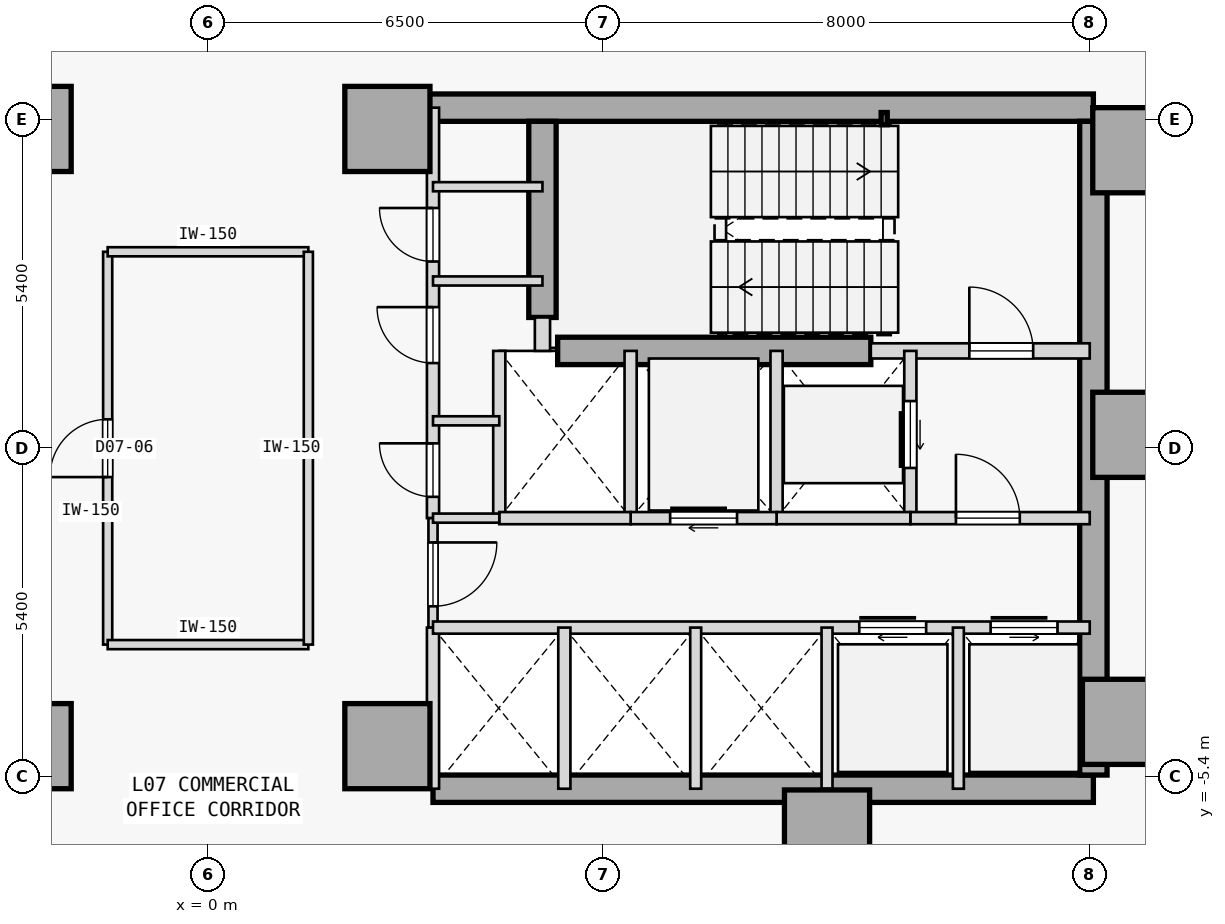
"""IFC4 building model, lengths in metres.
Left out: names, types, materials, properties, quantities, classifications, styles, units other than length and angle.
Written with IfcOpenShell. Run it as: python <this file> out.ifc"""

import sys

from ifc_helpers import new_model, si_unit, direction, frame, frame_2d, origin, origin_2d, place, context, subcontext, project, spatial, rectangle, hollow_rectangle, extrude, element, fill, save


model = new_model("IFC4")
c1 = context("Model", 3, precision=1e-05, world=origin(), true_north=direction((0.0, 1.0)))
c2 = subcontext(c1, "Body", "Model", "MODEL_VIEW")
j1 = project(units=[si_unit("LENGTHUNIT", "METRE"), si_unit("PLANEANGLEUNIT", "RADIAN")], contexts=[c1])
p1 = place(None, origin())
s1 = spatial("IfcSite", under=j1, at=p1, CompositionType="ELEMENT")
p2 = place(p1, origin())
s2 = spatial("IfcBuilding", under=s1, at=p2, CompositionType="ELEMENT")
p3 = place(p2, frame((0.0, 0.0, 33.2)))
s3 = spatial("IfcBuildingStorey", under=s2, at=p3, CompositionType="ELEMENT", Elevation=33.2)
for number, where, z_axis, x_axis in (
    (1, (-2.95, -4.9, 0.0), (0.0, 0.0, 1.0), (1.0, 0.0, 0.0)),
    (2, (-2.95, 5.25, 0.0), (0.0, 0.0, 1.0), (1.0, 0.0, 0.0)),
    (3, (15.25, 4.9, 0.0), (0.0, 0.0, 1.0), (1.0, 0.0, 0.0)),
    (4, (15.25, 0.22, 0.0), (0.0, 0.0, 1.0), (1.0, 0.0, 0.0)),
    (5, (15.08, -4.5, 0.0), (0.0, 0.0, 1.0), (1.0, 0.0, 0.0)),
    (6, (10.18, -6.32, 0.0), (0.0, 0.0, 1.0), (1.0, 0.0, 0.0)),
    (7, (2.95, -4.9, 0.0), (0.0, 0.0, 1.0), (1.0, 0.0, 0.0)),
    (8, (2.95, 5.25, 0.0), (0.0, 0.0, 1.0), (1.0, 0.0, 0.0)),
):
    element("IfcColumn", number, at=place(p3, frame(where, z_axis=z_axis, x_axis=x_axis)), inside=s3, PredefinedType="COLUMN", context=c2, shape_type="SweptSolid", body=[
        extrude(rectangle(XDim=1.4, YDim=1.4, at=origin_2d()), origin(), (0.0, 0.0, 1.0), 3.8),
    ])
p4 = place(p3, frame((3.15, 5.6, 0.0), z_axis=(0.0, 0.0, 1.0), x_axis=(1.0, 0.0, 0.0)))
e9 = element("IfcWall", 9, at=p4, inside=s3, PredefinedType="SHEAR", context=c2, shape_type="SweptSolid", body=[
    extrude(rectangle(XDim=11.41, YDim=0.45, at=frame_2d((5.705, 0.0))), origin(), (0.0, 0.0, 1.0), 3.575),
])
p5 = place(p3, frame((3.7, -5.6, 0.0), z_axis=(0.0, 0.0, 1.0), x_axis=(1.0, 0.0, 0.0)))
e10 = element("IfcWall", 10, at=p5, inside=s3, PredefinedType="SHEAR", context=c2, shape_type="SweptSolid", body=[
    extrude(rectangle(XDim=10.86, YDim=0.45, at=frame_2d((5.43, 0.0))), origin(), (0.0, 0.0, 1.0), 3.575),
])
p6 = place(p3, frame((14.56, -5.375, 0.0), z_axis=(0.0, 0.0, 1.0), x_axis=(0.0, 1.0, 0.0)))
e11 = element("IfcWall", 11, at=p6, inside=s3, PredefinedType="SHEAR", context=c2, shape_type="SweptSolid", body=[
    extrude(rectangle(XDim=10.75, YDim=0.45, at=frame_2d((5.375, 0.0))), origin(), (0.0, 0.0, 1.0), 3.575),
])
p7 = place(p3, frame((5.5, 2.15, 0.0), z_axis=(0.0, 0.0, 1.0), x_axis=(0.0, 1.0, 0.0)))
e12 = element("IfcWall", 12, at=p7, inside=s3, PredefinedType="SHEAR", context=c2, shape_type="SweptSolid", body=[
    extrude(rectangle(XDim=3.225, YDim=0.45, at=frame_2d((1.613, 0.0))), origin(), (0.0, 0.0, 1.0), 3.575),
])
p8 = place(p3, frame((5.75, 1.6, 0.0), z_axis=(0.0, 0.0, 1.0), x_axis=(1.0, 0.0, 0.0)))
e13 = element("IfcWall", 13, at=p8, inside=s3, PredefinedType="SHEAR", context=c2, shape_type="SweptSolid", body=[
    extrude(rectangle(XDim=5.15, YDim=0.45, at=frame_2d((2.575, 0.0))), origin(), (0.0, 0.0, 1.0), 3.575),
])
p9 = place(p3, frame((11.12, 5.42, 0.0), z_axis=(0.0, 0.0, 1.0), x_axis=(1.0, 0.0, 0.0)))
e14 = element("IfcColumn", 14, at=p9, inside=s3, PredefinedType="COLUMN", context=c2, shape_type="SweptSolid", body=[
    extrude(hollow_rectangle(XDim=0.1, YDim=0.2, WallThickness=0.008, at=origin_2d()), origin(), (0.0, 0.0, 1.0), 3.8),
])
p10 = place(p3, frame((10.9, 1.6, 0.0), z_axis=(0.0, 0.0, 1.0), x_axis=(1.0, 0.0, 0.0)))
e15 = element("IfcWall", 15, at=p10, inside=s3, PredefinedType="STANDARD", context=c2, shape_type="SweptSolid", body=[
    extrude(rectangle(XDim=3.6, YDim=0.25, at=frame_2d((1.8, 0.0))), origin(), (0.0, 0.0, 1.0), 3.575),
])
p11 = place(p10, frame((1.62, 0.0, 0.0)))
e16 = element("IfcOpeningElement", 16, at=p11, cuts=e15, PredefinedType="OPENING", context=c2, shape_type="SweptSolid", body=[
    extrude(rectangle(XDim=1.05, YDim=2.15, at=frame_2d((0.525, 1.075))), frame((0.0, 0.135, 0.0), z_axis=(0.0, -1.0, 0.0), x_axis=(1.0, 0.0, 0.0)), (0.0, 0.0, 1.0), 0.27),
])
p12 = place(p3, frame((5.5, 1.6, 0.0), z_axis=(0.0, 0.0, 1.0), x_axis=(0.0, 1.0, 0.0)))
e17 = element("IfcWall", 17, at=p12, inside=s3, PredefinedType="STANDARD", context=c2, shape_type="SweptSolid", body=[
    extrude(rectangle(XDim=0.55, YDim=0.25, at=frame_2d((0.275, 0.0))), origin(), (0.0, 0.0, 1.0), 3.575),
])
p13 = place(p3, frame((3.7, -1.15, 0.0), z_axis=(0.0, 0.0, 1.0), x_axis=(0.0, 1.0, 0.0)))
e18 = element("IfcWall", 18, at=p13, inside=s3, PredefinedType="STANDARD", context=c2, shape_type="SweptSolid", body=[
    extrude(rectangle(XDim=6.75, YDim=0.2, at=frame_2d((3.375, 0.0))), origin(), (0.0, 0.0, 1.0), 3.575),
])
p14 = place(p13, frame((0.35, 0.0, 0.0)))
e19 = element("IfcOpeningElement", 19, at=p14, cuts=e18, PredefinedType="OPENING", context=c2, shape_type="SweptSolid", body=[
    extrude(rectangle(XDim=0.88, YDim=2.15, at=frame_2d((0.44, 1.075))), frame((0.0, 0.11, 0.0), z_axis=(0.0, -1.0, 0.0), x_axis=(1.0, 0.0, 0.0)), (0.0, 0.0, 1.0), 0.22),
])
p15 = place(p13, frame((2.55, 0.0, 0.0)))
e20 = element("IfcOpeningElement", 20, at=p15, cuts=e18, PredefinedType="OPENING", context=c2, shape_type="SweptSolid", body=[
    extrude(rectangle(XDim=0.92, YDim=2.15, at=frame_2d((0.46, 1.075))), frame((0.0, 0.11, 0.0), z_axis=(0.0, -1.0, 0.0), x_axis=(1.0, 0.0, 0.0)), (0.0, 0.0, 1.0), 0.22),
])
p16 = place(p13, frame((4.22, 0.0, 0.0)))
e21 = element("IfcOpeningElement", 21, at=p16, cuts=e18, PredefinedType="OPENING", context=c2, shape_type="SweptSolid", body=[
    extrude(rectangle(XDim=0.88, YDim=2.15, at=frame_2d((0.44, 1.075))), frame((0.0, 0.11, 0.0), z_axis=(0.0, -1.0, 0.0), x_axis=(1.0, 0.0, 0.0)), (0.0, 0.0, 1.0), 0.22),
])
p17 = place(p3, frame((3.7, -2.95, 0.0), z_axis=(0.0, 0.0, 1.0), x_axis=(0.0, 1.0, 0.0)))
e22 = element("IfcWall", 22, at=p17, inside=s3, PredefinedType="PARTITIONING", context=c2, shape_type="SweptSolid", body=[
    extrude(rectangle(XDim=1.8, YDim=0.15, at=frame_2d((0.9, 0.0))), origin(), (0.0, 0.0, 1.0), 3.575),
])
p18 = place(p17, frame((0.35, 0.0, 0.0)))
e23 = element("IfcOpeningElement", 23, at=p18, cuts=e22, PredefinedType="OPENING", context=c2, shape_type="SweptSolid", body=[
    extrude(rectangle(XDim=1.05, YDim=2.18, at=frame_2d((0.525, 1.09))), frame((0.0, 0.085, 0.0), z_axis=(0.0, -1.0, 0.0), x_axis=(1.0, 0.0, 0.0)), (0.0, 0.0, 1.0), 0.17),
])
p19 = place(p3, frame((3.7, -5.6, 0.0), z_axis=(0.0, 0.0, 1.0), x_axis=(0.0, 1.0, 0.0)))
e24 = element("IfcWall", 24, at=p19, inside=s3, PredefinedType="STANDARD", context=c2, shape_type="SweptSolid", body=[
    extrude(rectangle(XDim=2.65, YDim=0.2, at=frame_2d((1.325, 0.0))), origin(), (0.0, 0.0, 1.0), 3.575),
])
p20 = place(p3, frame((11.55, -1.15, 0.0), z_axis=(0.0, 0.0, 1.0), x_axis=(0.0, 1.0, 0.0)))
e25 = element("IfcWall", 25, at=p20, inside=s3, PredefinedType="STANDARD", context=c2, shape_type="SweptSolid", body=[
    extrude(rectangle(XDim=2.75, YDim=0.2, at=frame_2d((1.375, 0.0))), origin(), (0.0, 0.0, 1.0), 3.575),
])
p21 = place(p20, frame((0.825, 0.0, 0.0)))
e26 = element("IfcOpeningElement", 26, at=p21, cuts=e25, PredefinedType="OPENING", context=c2, shape_type="SweptSolid", body=[
    extrude(rectangle(XDim=1.1, YDim=2.15, at=frame_2d((0.55, 1.075))), frame((0.0, 0.11, 0.0), z_axis=(0.0, -1.0, 0.0), x_axis=(1.0, 0.0, 0.0)), (0.0, 0.0, 1.0), 0.22),
])
p22 = place(p3, frame((9.35, -1.15, 0.0), z_axis=(0.0, 0.0, 1.0), x_axis=(0.0, 1.0, 0.0)))
e27 = element("IfcWall", 27, at=p22, inside=s3, PredefinedType="STANDARD", context=c2, shape_type="SweptSolid", body=[
    extrude(rectangle(XDim=2.75, YDim=0.2, at=frame_2d((1.375, 0.0))), origin(), (0.0, 0.0, 1.0), 3.575),
])
p23 = place(p3, frame((11.55, -1.15, 0.0), z_axis=(0.0, 0.0, 1.0), x_axis=(1.0, 0.0, 0.0)))
e28 = element("IfcWall", 28, at=p23, inside=s3, PredefinedType="STANDARD", context=c2, shape_type="SweptSolid", body=[
    extrude(rectangle(XDim=2.95, YDim=0.2, at=frame_2d((1.475, 0.0))), origin(), (0.0, 0.0, 1.0), 3.575),
])
p24 = place(p23, frame((0.75, 0.0, 0.0)))
e29 = element("IfcOpeningElement", 29, at=p24, cuts=e28, PredefinedType="OPENING", context=c2, shape_type="SweptSolid", body=[
    extrude(rectangle(XDim=1.05, YDim=2.18, at=frame_2d((0.525, 1.09))), frame((0.0, 0.11, 0.0), z_axis=(0.0, -1.0, 0.0), x_axis=(1.0, 0.0, 0.0)), (0.0, 0.0, 1.0), 0.22),
])
p25 = place(p3, frame((9.35, -1.15, 0.0), z_axis=(0.0, 0.0, 1.0), x_axis=(1.0, 0.0, 0.0)))
e30 = element("IfcWall", 30, at=p25, inside=s3, PredefinedType="STANDARD", context=c2, shape_type="SweptSolid", body=[
    extrude(rectangle(XDim=2.2, YDim=0.2, at=frame_2d((1.1, 0.0))), origin(), (0.0, 0.0, 1.0), 3.575),
])
p26 = place(p3, frame((6.95, -1.15, 0.0), z_axis=(0.0, 0.0, 1.0), x_axis=(0.0, 1.0, 0.0)))
e31 = element("IfcWall", 31, at=p26, inside=s3, PredefinedType="STANDARD", context=c2, shape_type="SweptSolid", body=[
    extrude(rectangle(XDim=2.75, YDim=0.2, at=frame_2d((1.375, 0.0))), origin(), (0.0, 0.0, 1.0), 3.575),
])
p27 = place(p3, frame((6.95, -1.15, 0.0), z_axis=(0.0, 0.0, 1.0), x_axis=(1.0, 0.0, 0.0)))
e32 = element("IfcWall", 32, at=p27, inside=s3, PredefinedType="STANDARD", context=c2, shape_type="SweptSolid", body=[
    extrude(rectangle(XDim=2.4, YDim=0.2, at=frame_2d((1.2, 0.0))), origin(), (0.0, 0.0, 1.0), 3.575),
])
p28 = place(p27, frame((0.65, 0.0, 0.0)))
e33 = element("IfcOpeningElement", 33, at=p28, cuts=e32, PredefinedType="OPENING", context=c2, shape_type="SweptSolid", body=[
    extrude(rectangle(XDim=1.1, YDim=2.15, at=frame_2d((0.55, 1.075))), frame((0.0, 0.11, 0.0), z_axis=(0.0, -1.0, 0.0), x_axis=(1.0, 0.0, 0.0)), (0.0, 0.0, 1.0), 0.22),
])
p29 = place(p3, frame((4.79, -1.15, 0.0), z_axis=(0.0, 0.0, 1.0), x_axis=(0.0, 1.0, 0.0)))
e34 = element("IfcWall", 34, at=p29, inside=s3, PredefinedType="STANDARD", context=c2, shape_type="SweptSolid", body=[
    extrude(rectangle(XDim=2.75, YDim=0.2, at=frame_2d((1.375, 0.0))), origin(), (0.0, 0.0, 1.0), 3.575),
])
p30 = place(p3, frame((4.79, -1.15, 0.0), z_axis=(0.0, 0.0, 1.0), x_axis=(1.0, 0.0, 0.0)))
e35 = element("IfcWall", 35, at=p30, inside=s3, PredefinedType="STANDARD", context=c2, shape_type="SweptSolid", body=[
    extrude(rectangle(XDim=2.16, YDim=0.2, at=frame_2d((1.08, 0.0))), origin(), (0.0, 0.0, 1.0), 3.575),
])
p31 = place(p3, frame((3.7, -1.15, 0.0), z_axis=(0.0, 0.0, 1.0), x_axis=(1.0, 0.0, 0.0)))
e36 = element("IfcWall", 36, at=p31, inside=s3, PredefinedType="PARTITIONING", context=c2, shape_type="SweptSolid", body=[
    extrude(rectangle(XDim=1.09, YDim=0.15, at=frame_2d((0.545, 0.0))), origin(), (0.0, 0.0, 1.0), 3.575),
])
p32 = place(p3, frame((3.7, -2.95, 0.0), z_axis=(0.0, 0.0, 1.0), x_axis=(1.0, 0.0, 0.0)))
e37 = element("IfcWall", 37, at=p32, inside=s3, PredefinedType="STANDARD", context=c2, shape_type="SweptSolid", body=[
    extrude(rectangle(XDim=10.8, YDim=0.2, at=frame_2d((5.4, 0.0))), origin(), (0.0, 0.0, 1.0), 3.575),
])
p33 = place(p32, frame((7.01, 0.0, 0.0)))
e38 = element("IfcOpeningElement", 38, at=p33, cuts=e37, PredefinedType="OPENING", context=c2, shape_type="SweptSolid", body=[
    extrude(rectangle(XDim=1.1, YDim=2.15, at=frame_2d((0.55, 1.075))), frame((0.0, 0.11, 0.0), z_axis=(0.0, -1.0, 0.0), x_axis=(1.0, 0.0, 0.0)), (0.0, 0.0, 1.0), 0.22),
])
p34 = place(p32, frame((9.17, 0.0, 0.0)))
e39 = element("IfcOpeningElement", 39, at=p34, cuts=e37, PredefinedType="OPENING", context=c2, shape_type="SweptSolid", body=[
    extrude(rectangle(XDim=1.1, YDim=2.15, at=frame_2d((0.55, 1.075))), frame((0.0, 0.11, 0.0), z_axis=(0.0, -1.0, 0.0), x_axis=(1.0, 0.0, 0.0)), (0.0, 0.0, 1.0), 0.22),
])
p35 = place(p3, frame((5.86, -5.6, 0.0), z_axis=(0.0, 0.0, 1.0), x_axis=(0.0, 1.0, 0.0)))
e40 = element("IfcWall", 40, at=p35, inside=s3, PredefinedType="STANDARD", context=c2, shape_type="SweptSolid", body=[
    extrude(rectangle(XDim=2.65, YDim=0.2, at=frame_2d((1.325, 0.0))), origin(), (0.0, 0.0, 1.0), 3.575),
])
for number, where, z_axis, x_axis in (
    (41, (12.34, -5.6, 0.0), (0.0, 0.0, 1.0), (0.0, 1.0, 0.0)),
    (42, (10.18, -5.6, 0.0), (0.0, 0.0, 1.0), (0.0, 1.0, 0.0)),
    (43, (8.02, -5.6, 0.0), (0.0, 0.0, 1.0), (0.0, 1.0, 0.0)),
):
    element("IfcWall", number, at=place(p3, frame(where, z_axis=z_axis, x_axis=x_axis)), inside=s3, PredefinedType="STANDARD", context=c2, shape_type="SweptSolid", body=[
        extrude(rectangle(XDim=2.65, YDim=0.18, at=frame_2d((1.325, 0.0))), origin(), (0.0, 0.0, 1.0), 3.575),
    ])
p36 = place(p3, frame((3.7, 4.3, 0.0), z_axis=(0.0, 0.0, 1.0), x_axis=(1.0, 0.0, 0.0)))
e44 = element("IfcWall", 44, at=p36, inside=s3, PredefinedType="PARTITIONING", context=c2, shape_type="SweptSolid", body=[
    extrude(rectangle(XDim=1.8, YDim=0.15, at=frame_2d((0.9, 0.0))), origin(), (0.0, 0.0, 1.0), 3.575),
])
p37 = place(p3, frame((3.7, 0.45, 0.0), z_axis=(0.0, 0.0, 1.0), x_axis=(1.0, 0.0, 0.0)))
e45 = element("IfcWall", 45, at=p37, inside=s3, PredefinedType="PARTITIONING", context=c2, shape_type="SweptSolid", body=[
    extrude(rectangle(XDim=1.09, YDim=0.15, at=frame_2d((0.545, 0.0))), origin(), (0.0, 0.0, 1.0), 3.575),
])
p38 = place(p3, frame((3.7, 2.75, 0.0), z_axis=(0.0, 0.0, 1.0), x_axis=(1.0, 0.0, 0.0)))
e46 = element("IfcWall", 46, at=p38, inside=s3, PredefinedType="PARTITIONING", context=c2, shape_type="SweptSolid", body=[
    extrude(rectangle(XDim=1.8, YDim=0.15, at=frame_2d((0.9, 0.0))), origin(), (0.0, 0.0, 1.0), 3.575),
])
p39 = place(p3, frame((-1.65, -3.23, 0.0), z_axis=(0.0, 0.0, 1.0), x_axis=(0.0, 1.0, 0.0)))
e47 = element("IfcWall", 47, at=p39, inside=s3, PredefinedType="PARTITIONING", context=c2, shape_type="SweptSolid", body=[
    extrude(rectangle(XDim=6.46, YDim=0.15, at=frame_2d((3.23, 0.0))), origin(), (0.0, 0.0, 1.0), 3.575),
])
p40 = place(p39, frame((2.755, 0.0, 0.0)))
e48 = element("IfcOpeningElement", 48, at=p40, cuts=e47, PredefinedType="OPENING", context=c2, shape_type="SweptSolid", body=[
    extrude(rectangle(XDim=0.95, YDim=2.15, at=frame_2d((0.475, 1.075))), frame((0.0, 0.085, 0.0), z_axis=(0.0, -1.0, 0.0), x_axis=(1.0, 0.0, 0.0)), (0.0, 0.0, 1.0), 0.17),
])
for number, where, z_axis, x_axis in (
    (49, (-1.65, -3.23, 0.0), (0.0, 0.0, 1.0), (1.0, 0.0, 0.0)),
    (50, (-1.65, 3.23, 0.0), (0.0, 0.0, 1.0), (1.0, 0.0, 0.0)),
):
    element("IfcWall", number, at=place(p3, frame(where, z_axis=z_axis, x_axis=x_axis)), inside=s3, PredefinedType="PARTITIONING", context=c2, shape_type="SweptSolid", body=[
        extrude(rectangle(XDim=3.3, YDim=0.15, at=frame_2d((1.65, 0.0))), origin(), (0.0, 0.0, 1.0), 3.575),
    ])
p41 = place(p3, frame((1.65, -3.23, 0.0), z_axis=(0.0, 0.0, 1.0), x_axis=(0.0, 1.0, 0.0)))
e51 = element("IfcWall", 51, at=p41, inside=s3, PredefinedType="PARTITIONING", context=c2, shape_type="SweptSolid", body=[
    extrude(rectangle(XDim=6.46, YDim=0.15, at=frame_2d((3.23, 0.0))), origin(), (0.0, 0.0, 1.0), 3.575),
])
p42 = place(p11, origin())
e52 = element("IfcDoor", 52, at=p42, inside=s3, OperationType="SINGLE_SWING_LEFT", PredefinedType="DOOR", context=c2, shape_type="SweptSolid", body=[
    extrude(rectangle(XDim=1.05, YDim=2.15, at=frame_2d((0.525, 1.075))), frame((0.0, 0.025, 0.0), z_axis=(0.0, -1.0, 0.0), x_axis=(1.0, 0.0, 0.0)), (0.0, 0.0, 1.0), 0.05),
])
fill(e16, e52)
p43 = place(p24, origin())
e53 = element("IfcDoor", 53, at=p43, inside=s3, OperationType="SINGLE_SWING_LEFT", PredefinedType="DOOR", context=c2, shape_type="SweptSolid", body=[
    extrude(rectangle(XDim=1.05, YDim=2.18, at=frame_2d((0.525, 1.09))), frame((0.0, 0.025, 0.0), z_axis=(0.0, -1.0, 0.0), x_axis=(1.0, 0.0, 0.0)), (0.0, 0.0, 1.0), 0.05),
])
fill(e29, e53)
p44 = place(p18, frame((1.05, 0.0, 0.0), z_axis=(0.0, 0.0, 1.0), x_axis=(-1.0, 0.0, 0.0)))
e54 = element("IfcDoor", 54, at=p44, inside=s3, OperationType="SINGLE_SWING_RIGHT", PredefinedType="DOOR", context=c2, shape_type="SweptSolid", body=[
    extrude(rectangle(XDim=1.05, YDim=2.18, at=frame_2d((0.525, 1.09))), frame((0.0, 0.025, 0.0), z_axis=(0.0, -1.0, 0.0), x_axis=(1.0, 0.0, 0.0)), (0.0, 0.0, 1.0), 0.05),
])
fill(e23, e54)
p45 = place(p21, origin())
e55 = element("IfcDoor", 55, at=p45, inside=s3, OperationType="SLIDING_TO_RIGHT", PredefinedType="DOOR", context=c2, shape_type="SweptSolid", body=[
    extrude(rectangle(XDim=1.1, YDim=2.15, at=frame_2d((0.55, 1.075))), frame((0.0, 0.025, 0.0), z_axis=(0.0, -1.0, 0.0), x_axis=(1.0, 0.0, 0.0)), (0.0, 0.0, 1.0), 0.05),
])
fill(e26, e55)
p46 = place(p28, origin())
e56 = element("IfcDoor", 56, at=p46, inside=s3, OperationType="SLIDING_TO_RIGHT", PredefinedType="DOOR", context=c2, shape_type="SweptSolid", body=[
    extrude(rectangle(XDim=1.1, YDim=2.15, at=frame_2d((0.55, 1.075))), frame((0.0, 0.025, 0.0), z_axis=(0.0, -1.0, 0.0), x_axis=(1.0, 0.0, 0.0)), (0.0, 0.0, 1.0), 0.05),
])
fill(e33, e56)
p47 = place(p33, origin())
e57 = element("IfcDoor", 57, at=p47, inside=s3, OperationType="SLIDING_TO_RIGHT", PredefinedType="DOOR", context=c2, shape_type="SweptSolid", body=[
    extrude(rectangle(XDim=1.1, YDim=2.15, at=frame_2d((0.55, 1.075))), frame((0.0, 0.025, 0.0), z_axis=(0.0, -1.0, 0.0), x_axis=(1.0, 0.0, 0.0)), (0.0, 0.0, 1.0), 0.05),
])
fill(e38, e57)
p48 = place(p34, origin())
e58 = element("IfcDoor", 58, at=p48, inside=s3, OperationType="SLIDING_TO_LEFT", PredefinedType="DOOR", context=c2, shape_type="SweptSolid", body=[
    extrude(rectangle(XDim=1.1, YDim=2.15, at=frame_2d((0.55, 1.075))), frame((0.0, 0.025, 0.0), z_axis=(0.0, -1.0, 0.0), x_axis=(1.0, 0.0, 0.0)), (0.0, 0.0, 1.0), 0.05),
])
fill(e39, e58)
p49 = place(p14, origin())
e59 = element("IfcDoor", 59, at=p49, inside=s3, OperationType="SINGLE_SWING_RIGHT", PredefinedType="DOOR", context=c2, shape_type="SweptSolid", body=[
    extrude(rectangle(XDim=0.88, YDim=2.15, at=frame_2d((0.44, 1.075))), frame((0.0, 0.025, 0.0), z_axis=(0.0, -1.0, 0.0), x_axis=(1.0, 0.0, 0.0)), (0.0, 0.0, 1.0), 0.05),
])
fill(e19, e59)
p50 = place(p15, origin())
e60 = element("IfcDoor", 60, at=p50, inside=s3, OperationType="SINGLE_SWING_RIGHT", PredefinedType="DOOR", context=c2, shape_type="SweptSolid", body=[
    extrude(rectangle(XDim=0.92, YDim=2.15, at=frame_2d((0.46, 1.075))), frame((0.0, 0.025, 0.0), z_axis=(0.0, -1.0, 0.0), x_axis=(1.0, 0.0, 0.0)), (0.0, 0.0, 1.0), 0.05),
])
fill(e20, e60)
p51 = place(p16, origin())
e61 = element("IfcDoor", 61, at=p51, inside=s3, OperationType="SINGLE_SWING_RIGHT", PredefinedType="DOOR", context=c2, shape_type="SweptSolid", body=[
    extrude(rectangle(XDim=0.88, YDim=2.15, at=frame_2d((0.44, 1.075))), frame((0.0, 0.025, 0.0), z_axis=(0.0, -1.0, 0.0), x_axis=(1.0, 0.0, 0.0)), (0.0, 0.0, 1.0), 0.05),
])
fill(e21, e61)
p52 = place(p40, origin())
e62 = element("IfcDoor", 62, at=p52, inside=s3, OperationType="SINGLE_SWING_LEFT", PredefinedType="DOOR", context=c2, shape_type="SweptSolid", body=[
    extrude(rectangle(XDim=0.95, YDim=2.15, at=frame_2d((0.475, 1.075))), frame((0.0, 0.025, 0.0), z_axis=(0.0, -1.0, 0.0), x_axis=(1.0, 0.0, 0.0)), (0.0, 0.0, 1.0), 0.05),
])
fill(e48, e62)
save(model, sys.argv[1])
